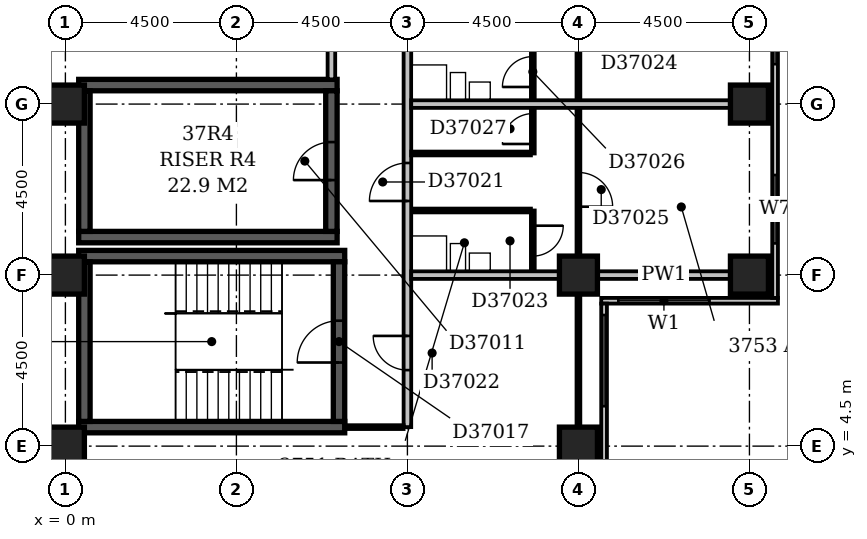
"""IFC4 building model, lengths in metres.
Left out: names, types, materials, properties, quantities, classifications, styles, units other than length and angle.
Written with IfcOpenShell. Run it as: python <this file> out.ifc"""

import sys

from ifc_helpers import new_model, si_unit, direction, frame, frame_2d, origin, origin_2d, place, context, subcontext, project, spatial, rectangle, extrude, element, fill, save


model = new_model("IFC4")
c1 = context("Model", 3, precision=1e-05, world=origin(), true_north=direction((0.0, 1.0)))
c2 = subcontext(c1, "Body", "Model", "MODEL_VIEW")
j1 = project(units=[si_unit("LENGTHUNIT", "METRE"), si_unit("PLANEANGLEUNIT", "RADIAN")], contexts=[c1])
p1 = place(None, origin())
s1 = spatial("IfcSite", under=j1, at=p1, CompositionType="ELEMENT")
p2 = place(p1, origin())
s2 = spatial("IfcBuilding", under=s1, at=p2, CompositionType="ELEMENT")
p3 = place(p2, frame((0.0, 0.0, 148.4)))
s3 = spatial("IfcBuildingStorey", under=s2, at=p3, CompositionType="ELEMENT", Elevation=148.4)
for number, where, z_axis, x_axis in (
    (1, (0.35, 5.0, -0.3), (0.0, 0.0, 1.0), (1.0, 0.0, 0.0)),
    (2, (0.35, 9.5, -0.3), (0.0, 0.0, 1.0), (1.0, 0.0, 0.0)),
):
    element("IfcWall", number, at=place(p3, frame(where, z_axis=z_axis, x_axis=x_axis)), inside=s3, PredefinedType="SHEAR", context=c2, shape_type="SweptSolid", body=[
        extrude(rectangle(XDim=7.0, YDim=0.3, at=frame_2d((3.5, 0.0))), origin(), (0.0, 0.0, 1.0), 3.6),
    ])
for number, where, z_axis, x_axis in (
    (3, (0.35, 10.0, -0.3), (0.0, 0.0, 1.0), (1.0, 0.0, 0.0)),
    (4, (0.35, 14.0, -0.3), (0.0, 0.0, 1.0), (1.0, 0.0, 0.0)),
):
    element("IfcWall", number, at=place(p3, frame(where, z_axis=z_axis, x_axis=x_axis)), inside=s3, PredefinedType="SHEAR", context=c2, shape_type="SweptSolid", body=[
        extrude(rectangle(XDim=6.8, YDim=0.3, at=frame_2d((3.4, 0.0))), origin(), (0.0, 0.0, 1.0), 3.6),
    ])
p4 = place(p3, frame((0.5, 5.15, -0.3), z_axis=(0.0, 0.0, 1.0), x_axis=(0.0, 1.0, 0.0)))
e5 = element("IfcWall", 5, at=p4, inside=s3, PredefinedType="SHEAR", context=c2, shape_type="SweptSolid", body=[
    extrude(rectangle(XDim=4.2, YDim=0.3, at=frame_2d((2.1, 0.0))), origin(), (0.0, 0.0, 1.0), 3.6),
])
p5 = place(p3, frame((0.5, 10.15, -0.3), z_axis=(0.0, 0.0, 1.0), x_axis=(0.0, 1.0, 0.0)))
e6 = element("IfcWall", 6, at=p5, inside=s3, PredefinedType="SHEAR", context=c2, shape_type="SweptSolid", body=[
    extrude(rectangle(XDim=3.7, YDim=0.3, at=frame_2d((1.85, 0.0))), origin(), (0.0, 0.0, 1.0), 3.6),
])
p6 = place(p3, frame((7.0, 10.15, -0.3), z_axis=(0.0, 0.0, 1.0), x_axis=(0.0, 1.0, 0.0)))
e7 = element("IfcWall", 7, at=p6, inside=s3, PredefinedType="SHEAR", context=c2, shape_type="SweptSolid", body=[
    extrude(rectangle(XDim=3.7, YDim=0.3, at=frame_2d((1.85, 0.0))), origin(), (0.0, 0.0, 1.0), 3.6),
])
p7 = place(p6, frame((1.35, 0.0, 0.3)))
e8 = element("IfcOpeningElement", 8, at=p7, cuts=e7, PredefinedType="OPENING", context=c2, shape_type="SweptSolid", body=[
    extrude(rectangle(XDim=1.0, YDim=2.1, at=frame_2d((0.5, 1.05))), frame((0.0, 0.162, 0.0), z_axis=(0.0, -1.0, 0.0), x_axis=(1.0, 0.0, 0.0)), (0.0, 0.0, 1.0), 0.324),
])
p8 = place(p3, frame((7.2, 5.15, -0.3), z_axis=(0.0, 0.0, 1.0), x_axis=(0.0, 1.0, 0.0)))
e9 = element("IfcWall", 9, at=p8, inside=s3, PredefinedType="SHEAR", context=c2, shape_type="SweptSolid", body=[
    extrude(rectangle(XDim=4.2, YDim=0.3, at=frame_2d((2.1, 0.0))), origin(), (0.0, 0.0, 1.0), 3.6),
])
p9 = place(p8, frame((1.55, 0.0, 0.3)))
e10 = element("IfcOpeningElement", 10, at=p9, cuts=e9, PredefinedType="OPENING", context=c2, shape_type="SweptSolid", body=[
    extrude(rectangle(XDim=1.1, YDim=2.1, at=frame_2d((0.55, 1.05))), frame((0.0, 0.162, 0.0), z_axis=(0.0, -1.0, 0.0), x_axis=(1.0, 0.0, 0.0)), (0.0, 0.0, 1.0), 0.324),
])
for number, where, z_axis, x_axis in (
    (11, (0.0, 4.5, -0.3), (0.0, 0.0, 1.0), (1.0, 0.0, 0.0)),
    (12, (13.5, 4.5, -0.3), (0.0, 0.0, 1.0), (1.0, 0.0, 0.0)),
    (13, (0.0, 9.0, -0.3), (0.0, 0.0, 1.0), (1.0, 0.0, 0.0)),
    (14, (13.5, 9.0, -0.3), (0.0, 0.0, 1.0), (1.0, 0.0, 0.0)),
    (15, (18.0, 9.0, -0.3), (0.0, 0.0, 1.0), (1.0, 0.0, 0.0)),
    (16, (0.0, 13.5, -0.3), (0.0, 0.0, 1.0), (1.0, 0.0, 0.0)),
    (17, (18.0, 13.5, -0.3), (0.0, 0.0, 1.0), (1.0, 0.0, 0.0)),
):
    element("IfcColumn", number, at=place(p3, frame(where, z_axis=z_axis, x_axis=x_axis)), inside=s3, PredefinedType="COLUMN", context=c2, shape_type="SweptSolid", body=[
        extrude(rectangle(XDim=1.0, YDim=1.0, at=origin_2d()), origin(), (0.0, 0.0, 1.0), 3.6),
    ])
p10 = place(p3, frame((14.175, 3.9, 0.0), z_axis=(0.0, 0.0, 1.0), x_axis=(0.0, 1.0, 0.0)))
e18 = element("IfcWall", 18, at=p10, inside=s3, PredefinedType="STANDARD", context=c2, shape_type="SweptSolid", body=[
    extrude(rectangle(XDim=4.35, YDim=0.15, at=frame_2d((2.175, 0.0))), origin(), (0.0, 0.0, 1.0), 2.7),
])
p11 = place(p10, frame((1.65, 0.0, 0.6)))
e19 = element("IfcOpeningElement", 19, at=p11, cuts=e18, PredefinedType="OPENING", context=c2, shape_type="SweptSolid", body=[
    extrude(rectangle(XDim=2.4, YDim=1.8, at=frame_2d((1.2, 0.9))), frame((0.0, 0.087, 0.0), z_axis=(0.0, -1.0, 0.0), x_axis=(1.0, 0.0, 0.0)), (0.0, 0.0, 1.0), 0.174),
])
p12 = place(p3, frame((14.1, 8.325, 0.0), z_axis=(0.0, 0.0, 1.0), x_axis=(1.0, 0.0, 0.0)))
e20 = element("IfcWall", 20, at=p12, inside=s3, PredefinedType="STANDARD", context=c2, shape_type="SweptSolid", body=[
    extrude(rectangle(XDim=4.65, YDim=0.15, at=frame_2d((2.325, 0.0))), origin(), (0.0, 0.0, 1.0), 2.7),
])
p13 = place(p12, frame((0.45, 0.0, 0.6)))
e21 = element("IfcOpeningElement", 21, at=p13, cuts=e20, PredefinedType="OPENING", context=c2, shape_type="SweptSolid", body=[
    extrude(rectangle(XDim=2.4, YDim=1.8, at=frame_2d((1.2, 0.9))), frame((0.0, 0.087, 0.0), z_axis=(0.0, -1.0, 0.0), x_axis=(1.0, 0.0, 0.0)), (0.0, 0.0, 1.0), 0.174),
])
p14 = place(p3, frame((18.675, 8.4, 0.0), z_axis=(0.0, 0.0, 1.0), x_axis=(0.0, 1.0, 0.0)))
e22 = element("IfcWall", 22, at=p14, inside=s3, PredefinedType="STANDARD", context=c2, shape_type="SweptSolid", body=[
    extrude(rectangle(XDim=8.85, YDim=0.15, at=frame_2d((4.425, 0.0))), origin(), (0.0, 0.0, 1.0), 2.7),
])
p15 = place(p14, frame((1.434, 0.0, 0.6)))
e23 = element("IfcOpeningElement", 23, at=p15, cuts=e22, PredefinedType="OPENING", context=c2, shape_type="SweptSolid", body=[
    extrude(rectangle(XDim=1.8, YDim=1.8, at=frame_2d((0.9, 0.9))), frame((0.0, 0.087, 0.0), z_axis=(0.0, -1.0, 0.0), x_axis=(1.0, 0.0, 0.0)), (0.0, 0.0, 1.0), 0.174),
])
p16 = place(p14, frame((6.15, 0.0, 0.6)))
e24 = element("IfcOpeningElement", 24, at=p16, cuts=e22, PredefinedType="OPENING", context=c2, shape_type="SweptSolid", body=[
    extrude(rectangle(XDim=2.4, YDim=1.8, at=frame_2d((1.2, 0.9))), frame((0.0, 0.087, 0.0), z_axis=(0.0, -1.0, 0.0), x_axis=(1.0, 0.0, 0.0)), (0.0, 0.0, 1.0), 0.174),
])
p17 = place(p3, frame((0.0, 4.5, 0.0), z_axis=(0.0, 0.0, 1.0), x_axis=(0.0, 1.0, 0.0)))
e25 = element("IfcWall", 25, at=p17, inside=s3, PredefinedType="PARTITIONING", context=c2, shape_type="SweptSolid", body=[
    extrude(rectangle(XDim=0.5, YDim=0.1, at=frame_2d((0.25, 0.0))), origin(), (0.0, 0.0, 1.0), 2.7),
])
p18 = place(p3, frame((7.349, 5.0, 0.0), z_axis=(0.0, 0.0, 1.0), x_axis=(1.0, 0.0, 0.0)))
e26 = element("IfcWall", 26, at=p18, inside=s3, PredefinedType="PARTITIONING", context=c2, shape_type="SweptSolid", body=[
    extrude(rectangle(XDim=1.551, YDim=0.1, at=frame_2d((0.775, 0.0))), origin(), (0.0, 0.0, 1.0), 3.3),
])
p19 = place(p3, frame((9.0, 5.0, 0.0), z_axis=(0.0, 0.0, 1.0), x_axis=(0.0, 1.0, 0.0)))
e27 = element("IfcWall", 27, at=p19, inside=s3, PredefinedType="PARTITIONING", context=c2, shape_type="SweptSolid", body=[
    extrude(rectangle(XDim=27.75, YDim=0.2, at=frame_2d((13.875, 0.0))), origin(), (0.0, 0.0, 1.0), 3.3),
])
p20 = place(p19, frame((22.8, 0.0, 0.0)))
e28 = element("IfcOpeningElement", 28, at=p20, cuts=e27, PredefinedType="OPENING", context=c2, shape_type="SweptSolid", body=[
    extrude(rectangle(XDim=1.0, YDim=2.1, at=frame_2d((0.5, 1.05))), frame((0.0, 0.112, 0.0), z_axis=(0.0, -1.0, 0.0), x_axis=(1.0, 0.0, 0.0)), (0.0, 0.0, 1.0), 0.224),
])
p21 = place(p19, frame((14.95, 0.0, 0.0)))
e29 = element("IfcOpeningElement", 29, at=p21, cuts=e27, PredefinedType="OPENING", context=c2, shape_type="SweptSolid", body=[
    extrude(rectangle(XDim=1.0, YDim=2.1, at=frame_2d((0.5, 1.05))), frame((0.0, 0.112, 0.0), z_axis=(0.0, -1.0, 0.0), x_axis=(1.0, 0.0, 0.0)), (0.0, 0.0, 1.0), 0.224),
])
p22 = place(p19, frame((10.45, 0.0, 0.0)))
e30 = element("IfcOpeningElement", 30, at=p22, cuts=e27, PredefinedType="OPENING", context=c2, shape_type="SweptSolid", body=[
    extrude(rectangle(XDim=1.0, YDim=2.1, at=frame_2d((0.5, 1.05))), frame((0.0, 0.112, 0.0), z_axis=(0.0, -1.0, 0.0), x_axis=(1.0, 0.0, 0.0)), (0.0, 0.0, 1.0), 0.224),
])
p23 = place(p19, frame((5.95, 0.0, 0.0)))
e31 = element("IfcOpeningElement", 31, at=p23, cuts=e27, PredefinedType="OPENING", context=c2, shape_type="SweptSolid", body=[
    extrude(rectangle(XDim=1.0, YDim=2.1, at=frame_2d((0.5, 1.05))), frame((0.0, 0.112, 0.0), z_axis=(0.0, -1.0, 0.0), x_axis=(1.0, 0.0, 0.0)), (0.0, 0.0, 1.0), 0.224),
])
p24 = place(p19, frame((1.5, 0.0, 0.0)))
e32 = element("IfcOpeningElement", 32, at=p24, cuts=e27, PredefinedType="OPENING", context=c2, shape_type="SweptSolid", body=[
    extrude(rectangle(XDim=0.9, YDim=2.1, at=frame_2d((0.45, 1.05))), frame((0.0, 0.112, 0.0), z_axis=(0.0, -1.0, 0.0), x_axis=(1.0, 0.0, 0.0)), (0.0, 0.0, 1.0), 0.224),
])
p25 = place(p3, frame((13.5, 5.0, 0.0), z_axis=(0.0, 0.0, 1.0), x_axis=(0.0, 1.0, 0.0)))
e33 = element("IfcWall", 33, at=p25, inside=s3, PredefinedType="PARTITIONING", context=c2, shape_type="SweptSolid", body=[
    extrude(rectangle(XDim=3.5, YDim=0.1, at=frame_2d((1.75, 0.0))), origin(), (0.0, 0.0, 1.0), 2.7),
])
p26 = place(p3, frame((9.1, 9.0, 0.0), z_axis=(0.0, 0.0, 1.0), x_axis=(1.0, 0.0, 0.0)))
e34 = element("IfcWall", 34, at=p26, inside=s3, PredefinedType="PARTITIONING", context=c2, shape_type="SweptSolid", body=[
    extrude(rectangle(XDim=3.9, YDim=0.2, at=frame_2d((1.95, 0.0))), origin(), (0.0, 0.0, 1.0), 3.3),
])
p27 = place(p3, frame((14.0, 9.0, 0.0), z_axis=(0.0, 0.0, 1.0), x_axis=(1.0, 0.0, 0.0)))
e35 = element("IfcWall", 35, at=p27, inside=s3, PredefinedType="PARTITIONING", context=c2, shape_type="SweptSolid", body=[
    extrude(rectangle(XDim=3.5, YDim=0.2, at=frame_2d((1.75, 0.0))), origin(), (0.0, 0.0, 1.0), 2.7),
])
p28 = place(p3, frame((12.3, 9.1, 0.0), z_axis=(0.0, 0.0, 1.0), x_axis=(0.0, 1.0, 0.0)))
e36 = element("IfcWall", 36, at=p28, inside=s3, PredefinedType="PARTITIONING", context=c2, shape_type="SweptSolid", body=[
    extrude(rectangle(XDim=1.6, YDim=0.1, at=frame_2d((0.8, 0.0))), origin(), (0.0, 0.0, 1.0), 3.3),
])
p29 = place(p28, frame((0.4, 0.0, 0.0)))
e37 = element("IfcOpeningElement", 37, at=p29, cuts=e36, PredefinedType="OPENING", context=c2, shape_type="SweptSolid", body=[
    extrude(rectangle(XDim=0.8, YDim=2.1, at=frame_2d((0.4, 1.05))), frame((0.0, 0.062, 0.0), z_axis=(0.0, -1.0, 0.0), x_axis=(1.0, 0.0, 0.0)), (0.0, 0.0, 1.0), 0.124),
])
p30 = place(p3, frame((13.5, 9.5, 0.0), z_axis=(0.0, 0.0, 1.0), x_axis=(0.0, 1.0, 0.0)))
e38 = element("IfcWall", 38, at=p30, inside=s3, PredefinedType="PARTITIONING", context=c2, shape_type="SweptSolid", body=[
    extrude(rectangle(XDim=8.4, YDim=0.1, at=frame_2d((4.2, 0.0))), origin(), (0.0, 0.0, 1.0), 3.3),
])
p31 = place(p30, frame((5.8, 0.0, 0.0)))
e39 = element("IfcOpeningElement", 39, at=p31, cuts=e38, PredefinedType="OPENING", context=c2, shape_type="SweptSolid", body=[
    extrude(rectangle(XDim=0.9, YDim=2.1, at=frame_2d((0.45, 1.05))), frame((0.0, 0.062, 0.0), z_axis=(0.0, -1.0, 0.0), x_axis=(1.0, 0.0, 0.0)), (0.0, 0.0, 1.0), 0.124),
])
p32 = place(p30, frame((1.3, 0.0, 0.0)))
e40 = element("IfcOpeningElement", 40, at=p32, cuts=e38, PredefinedType="OPENING", context=c2, shape_type="SweptSolid", body=[
    extrude(rectangle(XDim=0.9, YDim=2.1, at=frame_2d((0.45, 1.05))), frame((0.0, 0.062, 0.0), z_axis=(0.0, -1.0, 0.0), x_axis=(1.0, 0.0, 0.0)), (0.0, 0.0, 1.0), 0.124),
])
p33 = place(p3, frame((9.1, 10.7, 0.0), z_axis=(0.0, 0.0, 1.0), x_axis=(1.0, 0.0, 0.0)))
e41 = element("IfcWall", 41, at=p33, inside=s3, PredefinedType="PLUMBINGWALL", context=c2, shape_type="SweptSolid", body=[
    extrude(rectangle(XDim=3.15, YDim=0.1, at=frame_2d((1.575, 0.0))), origin(), (0.0, 0.0, 1.0), 3.3),
])
p34 = place(p3, frame((9.1, 12.2, 0.0), z_axis=(0.0, 0.0, 1.0), x_axis=(1.0, 0.0, 0.0)))
e42 = element("IfcWall", 42, at=p34, inside=s3, PredefinedType="PARTITIONING", context=c2, shape_type="SweptSolid", body=[
    extrude(rectangle(XDim=3.15, YDim=0.1, at=frame_2d((1.575, 0.0))), origin(), (0.0, 0.0, 1.0), 3.3),
])
p35 = place(p3, frame((12.3, 12.2, 0.0), z_axis=(0.0, 0.0, 1.0), x_axis=(0.0, 1.0, 0.0)))
e43 = element("IfcWall", 43, at=p35, inside=s3, PredefinedType="PARTITIONING", context=c2, shape_type="SweptSolid", body=[
    extrude(rectangle(XDim=3.0, YDim=0.1, at=frame_2d((1.5, 0.0))), origin(), (0.0, 0.0, 1.0), 3.3),
])
p36 = place(p35, frame((1.75, 0.0, 0.0)))
e44 = element("IfcOpeningElement", 44, at=p36, cuts=e43, PredefinedType="OPENING", context=c2, shape_type="SweptSolid", body=[
    extrude(rectangle(XDim=0.8, YDim=2.1, at=frame_2d((0.4, 1.05))), frame((0.0, 0.062, 0.0), z_axis=(0.0, -1.0, 0.0), x_axis=(1.0, 0.0, 0.0)), (0.0, 0.0, 1.0), 0.124),
])
p37 = place(p35, frame((0.25, 0.0, 0.0)))
e45 = element("IfcOpeningElement", 45, at=p37, cuts=e43, PredefinedType="OPENING", context=c2, shape_type="SweptSolid", body=[
    extrude(rectangle(XDim=0.8, YDim=2.1, at=frame_2d((0.4, 1.05))), frame((0.0, 0.062, 0.0), z_axis=(0.0, -1.0, 0.0), x_axis=(1.0, 0.0, 0.0)), (0.0, 0.0, 1.0), 0.124),
])
p38 = place(p3, frame((9.1, 13.5, 0.0), z_axis=(0.0, 0.0, 1.0), x_axis=(1.0, 0.0, 0.0)))
e46 = element("IfcWall", 46, at=p38, inside=s3, PredefinedType="PARTITIONING", context=c2, shape_type="SweptSolid", body=[
    extrude(rectangle(XDim=8.4, YDim=0.2, at=frame_2d((4.2, 0.0))), origin(), (0.0, 0.0, 1.0), 3.3),
])
p39 = place(p3, frame((7.0, 14.15, 0.0), z_axis=(0.0, 0.0, 1.0), x_axis=(0.0, 1.0, 0.0)))
e47 = element("IfcWall", 47, at=p39, inside=s3, PredefinedType="PARTITIONING", context=c2, shape_type="SweptSolid", body=[
    extrude(rectangle(XDim=4.2, YDim=0.2, at=frame_2d((2.1, 0.0))), origin(), (0.0, 0.0, 1.0), 3.3),
])
p40 = place(p39, frame((1.6, 0.0, 0.0)))
e48 = element("IfcOpeningElement", 48, at=p40, cuts=e47, PredefinedType="OPENING", context=c2, shape_type="SweptSolid", body=[
    extrude(rectangle(XDim=1.0, YDim=2.1, at=frame_2d((0.5, 1.05))), frame((0.0, 0.112, 0.0), z_axis=(0.0, -1.0, 0.0), x_axis=(1.0, 0.0, 0.0)), (0.0, 0.0, 1.0), 0.224),
])
p41 = place(p11, origin())
e49 = element("IfcWindow", 49, at=p41, inside=s3, PartitioningType="SINGLE_PANEL", PredefinedType="WINDOW", context=c2, shape_type="SweptSolid", body=[
    extrude(rectangle(XDim=2.4, YDim=1.8, at=frame_2d((1.2, 0.9))), frame((0.0, 0.03, 0.0), z_axis=(0.0, -1.0, 0.0), x_axis=(1.0, 0.0, 0.0)), (0.0, 0.0, 1.0), 0.06),
])
fill(e19, e49)
p42 = place(p13, origin())
e50 = element("IfcWindow", 50, at=p42, inside=s3, PartitioningType="SINGLE_PANEL", PredefinedType="WINDOW", context=c2, shape_type="SweptSolid", body=[
    extrude(rectangle(XDim=2.4, YDim=1.8, at=frame_2d((1.2, 0.9))), frame((0.0, 0.03, 0.0), z_axis=(0.0, -1.0, 0.0), x_axis=(1.0, 0.0, 0.0)), (0.0, 0.0, 1.0), 0.06),
])
fill(e21, e50)
p43 = place(p15, origin())
e51 = element("IfcWindow", 51, at=p43, inside=s3, PartitioningType="SINGLE_PANEL", PredefinedType="WINDOW", context=c2, shape_type="SweptSolid", body=[
    extrude(rectangle(XDim=1.8, YDim=1.8, at=frame_2d((0.9, 0.9))), frame((0.0, 0.03, 0.0), z_axis=(0.0, -1.0, 0.0), x_axis=(1.0, 0.0, 0.0)), (0.0, 0.0, 1.0), 0.06),
])
fill(e23, e51)
p44 = place(p16, origin())
e52 = element("IfcWindow", 52, at=p44, inside=s3, PartitioningType="SINGLE_PANEL", PredefinedType="WINDOW", context=c2, shape_type="SweptSolid", body=[
    extrude(rectangle(XDim=2.4, YDim=1.8, at=frame_2d((1.2, 0.9))), frame((0.0, 0.03, 0.0), z_axis=(0.0, -1.0, 0.0), x_axis=(1.0, 0.0, 0.0)), (0.0, 0.0, 1.0), 0.06),
])
fill(e24, e52)
p45 = place(p7, origin())
e53 = element("IfcDoor", 53, at=p45, inside=s3, OperationType="SINGLE_SWING_LEFT", PredefinedType="DOOR", context=c2, shape_type="SweptSolid", body=[
    extrude(rectangle(XDim=1.0, YDim=2.1, at=frame_2d((0.5, 1.05))), frame((0.0, 0.025, 0.0), z_axis=(0.0, -1.0, 0.0), x_axis=(1.0, 0.0, 0.0)), (0.0, 0.0, 1.0), 0.05),
])
fill(e8, e53)
p46 = place(p9, origin())
e54 = element("IfcDoor", 54, at=p46, inside=s3, OperationType="SINGLE_SWING_LEFT", PredefinedType="DOOR", context=c2, shape_type="SweptSolid", body=[
    extrude(rectangle(XDim=1.1, YDim=2.1, at=frame_2d((0.55, 1.05))), frame((0.0, 0.025, 0.0), z_axis=(0.0, -1.0, 0.0), x_axis=(1.0, 0.0, 0.0)), (0.0, 0.0, 1.0), 0.05),
])
fill(e10, e54)
p47 = place(p23, origin())
e55 = element("IfcDoor", 55, at=p47, inside=s3, OperationType="SINGLE_SWING_LEFT", PredefinedType="DOOR", context=c2, shape_type="SweptSolid", body=[
    extrude(rectangle(XDim=1.0, YDim=2.1, at=frame_2d((0.5, 1.05))), frame((0.0, 0.025, 0.0), z_axis=(0.0, -1.0, 0.0), x_axis=(1.0, 0.0, 0.0)), (0.0, 0.0, 1.0), 0.05),
])
fill(e31, e55)
p48 = place(p24, frame((0.9, 0.0, 0.0), z_axis=(0.0, 0.0, 1.0), x_axis=(-1.0, 0.0, 0.0)))
e56 = element("IfcDoor", 56, at=p48, inside=s3, OperationType="SINGLE_SWING_LEFT", PredefinedType="DOOR", context=c2, shape_type="SweptSolid", body=[
    extrude(rectangle(XDim=0.9, YDim=2.1, at=frame_2d((0.45, 1.05))), frame((0.0, 0.025, 0.0), z_axis=(0.0, -1.0, 0.0), x_axis=(1.0, 0.0, 0.0)), (0.0, 0.0, 1.0), 0.05),
])
fill(e32, e56)
p49 = place(p29, origin())
e57 = element("IfcDoor", 57, at=p49, inside=s3, OperationType="SINGLE_SWING_RIGHT", PredefinedType="DOOR", context=c2, shape_type="SweptSolid", body=[
    extrude(rectangle(XDim=0.8, YDim=2.1, at=frame_2d((0.4, 1.05))), frame((0.0, 0.025, 0.0), z_axis=(0.0, -1.0, 0.0), x_axis=(1.0, 0.0, 0.0)), (0.0, 0.0, 1.0), 0.05),
])
fill(e37, e57)
p50 = place(p32, frame((0.9, 0.0, 0.0), z_axis=(0.0, 0.0, 1.0), x_axis=(-1.0, 0.0, 0.0)))
e58 = element("IfcDoor", 58, at=p50, inside=s3, OperationType="SINGLE_SWING_RIGHT", PredefinedType="DOOR", context=c2, shape_type="SweptSolid", body=[
    extrude(rectangle(XDim=0.9, YDim=2.1, at=frame_2d((0.45, 1.05))), frame((0.0, 0.025, 0.0), z_axis=(0.0, -1.0, 0.0), x_axis=(1.0, 0.0, 0.0)), (0.0, 0.0, 1.0), 0.05),
])
fill(e40, e58)
p51 = place(p36, origin())
e59 = element("IfcDoor", 59, at=p51, inside=s3, OperationType="SINGLE_SWING_LEFT", PredefinedType="DOOR", context=c2, shape_type="SweptSolid", body=[
    extrude(rectangle(XDim=0.8, YDim=2.1, at=frame_2d((0.4, 1.05))), frame((0.0, 0.025, 0.0), z_axis=(0.0, -1.0, 0.0), x_axis=(1.0, 0.0, 0.0)), (0.0, 0.0, 1.0), 0.05),
])
fill(e44, e59)
p52 = place(p37, origin())
e60 = element("IfcDoor", 60, at=p52, inside=s3, OperationType="SINGLE_SWING_LEFT", PredefinedType="DOOR", context=c2, shape_type="SweptSolid", body=[
    extrude(rectangle(XDim=0.8, YDim=2.1, at=frame_2d((0.4, 1.05))), frame((0.0, 0.025, 0.0), z_axis=(0.0, -1.0, 0.0), x_axis=(1.0, 0.0, 0.0)), (0.0, 0.0, 1.0), 0.05),
])
fill(e45, e60)
save(model, sys.argv[1])
